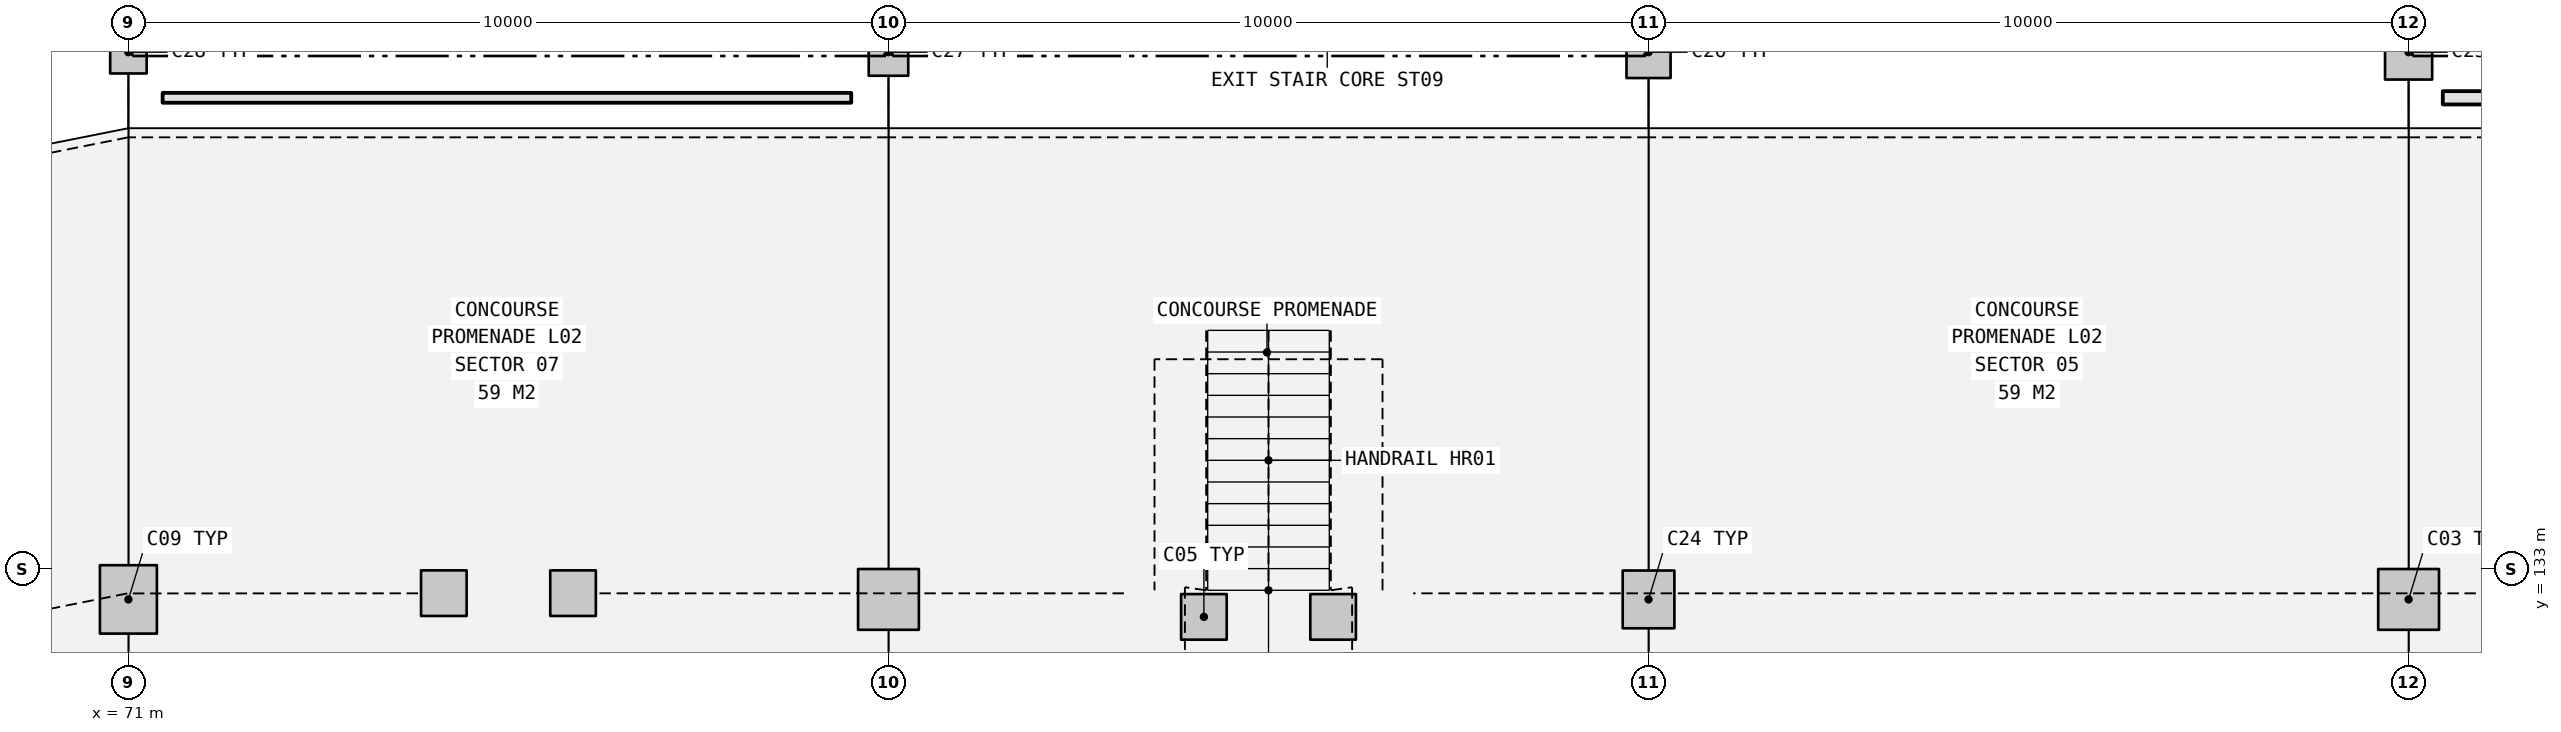
"""IFC4 building model, lengths in metres.
Left out: names, types, materials, properties, quantities, classifications, styles, units other than length and angle.
Written with IfcOpenShell. Run it as: python <this file> out.ifc"""

import sys

from ifc_helpers import new_model, si_unit, direction, frame, frame_2d, origin, origin_2d, place, context, subcontext, project, spatial, rectangle, extrude, element, save


model = new_model("IFC4")
c1 = context("Model", 3, precision=1e-05, world=origin(), true_north=direction((0.0, 1.0)))
c2 = subcontext(c1, "Body", "Model", "MODEL_VIEW")
j1 = project(units=[si_unit("LENGTHUNIT", "METRE"), si_unit("PLANEANGLEUNIT", "RADIAN")], contexts=[c1])
p1 = place(None, origin())
s1 = spatial("IfcSite", under=j1, at=p1, CompositionType="ELEMENT")
p2 = place(p1, origin())
s2 = spatial("IfcBuilding", under=s1, at=p2, CompositionType="ELEMENT")
p3 = place(p2, frame((0.0, 0.0, 10.8)))
s3 = spatial("IfcBuildingStorey", under=s2, at=p3, CompositionType="ELEMENT", Elevation=10.8)
p4 = place(p3, frame((101.0, 132.6, 0.0), z_axis=(0.0, 0.0, 1.0), x_axis=(1.0, 0.0, 0.0)))
e1 = element("IfcColumn", 1, at=p4, inside=s3, PredefinedType="COLUMN", context=c2, shape_type="SweptSolid", body=[
    extrude(rectangle(XDim=0.8, YDim=0.8, at=origin_2d()), origin(), (0.0, 0.0, 1.0), 5.4),
])
p5 = place(p3, frame((101.0, 139.8, 0.0), z_axis=(0.0, 0.0, 1.0), x_axis=(1.0, 0.0, 0.0)))
e2 = element("IfcColumn", 2, at=p5, inside=s3, PredefinedType="COLUMN", context=c2, shape_type="SweptSolid", body=[
    extrude(rectangle(XDim=0.62, YDim=0.72, at=origin_2d()), origin(), (0.0, 0.0, 1.0), 5.4),
])
p6 = place(p3, frame((91.0, 132.6, 0.0), z_axis=(0.0, 0.0, 1.0), x_axis=(1.0, 0.0, 0.0)))
e3 = element("IfcColumn", 3, at=p6, inside=s3, PredefinedType="COLUMN", context=c2, shape_type="SweptSolid", body=[
    extrude(rectangle(XDim=0.68, YDim=0.76, at=origin_2d()), origin(), (0.0, 0.0, 1.0), 5.4),
])
p7 = place(p3, frame((91.0, 139.8, 0.0), z_axis=(0.0, 0.0, 1.0), x_axis=(1.0, 0.0, 0.0)))
e4 = element("IfcColumn", 4, at=p7, inside=s3, PredefinedType="COLUMN", context=c2, shape_type="SweptSolid", body=[
    extrude(rectangle(XDim=0.58, YDim=0.68, at=origin_2d()), origin(), (0.0, 0.0, 1.0), 5.4),
])
p8 = place(p3, frame((81.0, 132.6, 0.0), z_axis=(0.0, 0.0, 1.0), x_axis=(1.0, 0.0, 0.0)))
e5 = element("IfcColumn", 5, at=p8, inside=s3, PredefinedType="COLUMN", context=c2, shape_type="SweptSolid", body=[
    extrude(rectangle(XDim=0.8, YDim=0.8, at=origin_2d()), origin(), (0.0, 0.0, 1.0), 5.4),
])
p9 = place(p3, frame((81.0, 139.8, 0.0), z_axis=(0.0, 0.0, 1.0), x_axis=(1.0, 0.0, 0.0)))
e6 = element("IfcColumn", 6, at=p9, inside=s3, PredefinedType="COLUMN", context=c2, shape_type="SweptSolid", body=[
    extrude(rectangle(XDim=0.52, YDim=0.62, at=origin_2d()), origin(), (0.0, 0.0, 1.0), 5.4),
])
p10 = place(p3, frame((71.0, 132.6, 0.0), z_axis=(0.0, 0.0, 1.0), x_axis=(1.0, 0.0, 0.0)))
e7 = element("IfcColumn", 7, at=p10, inside=s3, PredefinedType="COLUMN", context=c2, shape_type="SweptSolid", body=[
    extrude(rectangle(XDim=0.75, YDim=0.9, at=origin_2d()), origin(), (0.0, 0.0, 1.0), 5.4),
])
p11 = place(p3, frame((71.0, 139.8, 0.0), z_axis=(0.0, 0.0, 1.0), x_axis=(1.0, 0.0, 0.0)))
e8 = element("IfcColumn", 8, at=p11, inside=s3, PredefinedType="COLUMN", context=c2, shape_type="SweptSolid", body=[
    extrude(rectangle(XDim=0.48, YDim=0.56, at=origin_2d()), origin(), (0.0, 0.0, 1.0), 5.4),
])
for number, where, z_axis, x_axis in (
    (9, (85.15, 132.37, 0.0), (0.0, 0.0, 1.0), (1.0, 0.0, 0.0)),
    (10, (86.85, 132.37, 0.0), (0.0, 0.0, 1.0), (1.0, 0.0, 0.0)),
):
    element("IfcColumn", number, at=place(p3, frame(where, z_axis=z_axis, x_axis=x_axis)), inside=s3, PredefinedType="COLUMN", context=c2, shape_type="SweptSolid", body=[
        extrude(rectangle(XDim=0.6, YDim=0.6, at=origin_2d()), origin(), (0.0, 0.0, 1.0), 2.04),
    ])
for number, where, z_axis, x_axis in (
    (11, (75.15, 132.682, 0.0), (0.0, 0.0, 1.0), (1.0, 0.0, 0.0)),
    (12, (76.85, 132.682, 0.0), (0.0, 0.0, 1.0), (1.0, 0.0, 0.0)),
):
    element("IfcColumn", number, at=place(p3, frame(where, z_axis=z_axis, x_axis=x_axis)), inside=s3, PredefinedType="COLUMN", context=c2, shape_type="SweptSolid", body=[
        extrude(rectangle(XDim=0.6, YDim=0.6, at=origin_2d()), origin(), (0.0, 0.0, 1.0), 5.4),
    ])
p12 = place(p3, frame((110.51, 139.2, 0.0), z_axis=(0.0, 0.0, 1.0), x_axis=(-1.0, 0.0, 0.0)))
e13 = element("IfcWall", 13, at=p12, inside=s3, PredefinedType="PARTITIONING", context=c2, shape_type="SweptSolid", body=[
    extrude(rectangle(XDim=9.06, YDim=0.175, at=frame_2d((4.53, 0.0))), origin(), (0.0, 0.0, 1.0), 5.12),
])
p13 = place(p3, frame((91.0, 139.65, 0.0), z_axis=(0.0, 0.0, 1.0), x_axis=(0.0, 1.0, 0.0)))
e14 = element("IfcWall", 14, at=p13, inside=s3, PredefinedType="PARTITIONING", context=c2, shape_type="SweptSolid", body=[
    extrude(rectangle(XDim=6.5, YDim=0.17, at=frame_2d((3.25, 0.0))), origin(), (0.0, 0.0, 1.0), 4.285),
])
p14 = place(p3, frame((80.51, 139.2, 0.0), z_axis=(0.0, 0.0, 1.0), x_axis=(-1.0, 0.0, 0.0)))
e15 = element("IfcWall", 15, at=p14, inside=s3, PredefinedType="PARTITIONING", context=c2, shape_type="SweptSolid", body=[
    extrude(rectangle(XDim=9.06, YDim=0.13, at=frame_2d((4.53, 0.0))), origin(), (0.0, 0.0, 1.0), 5.12),
])
save(model, sys.argv[1])
